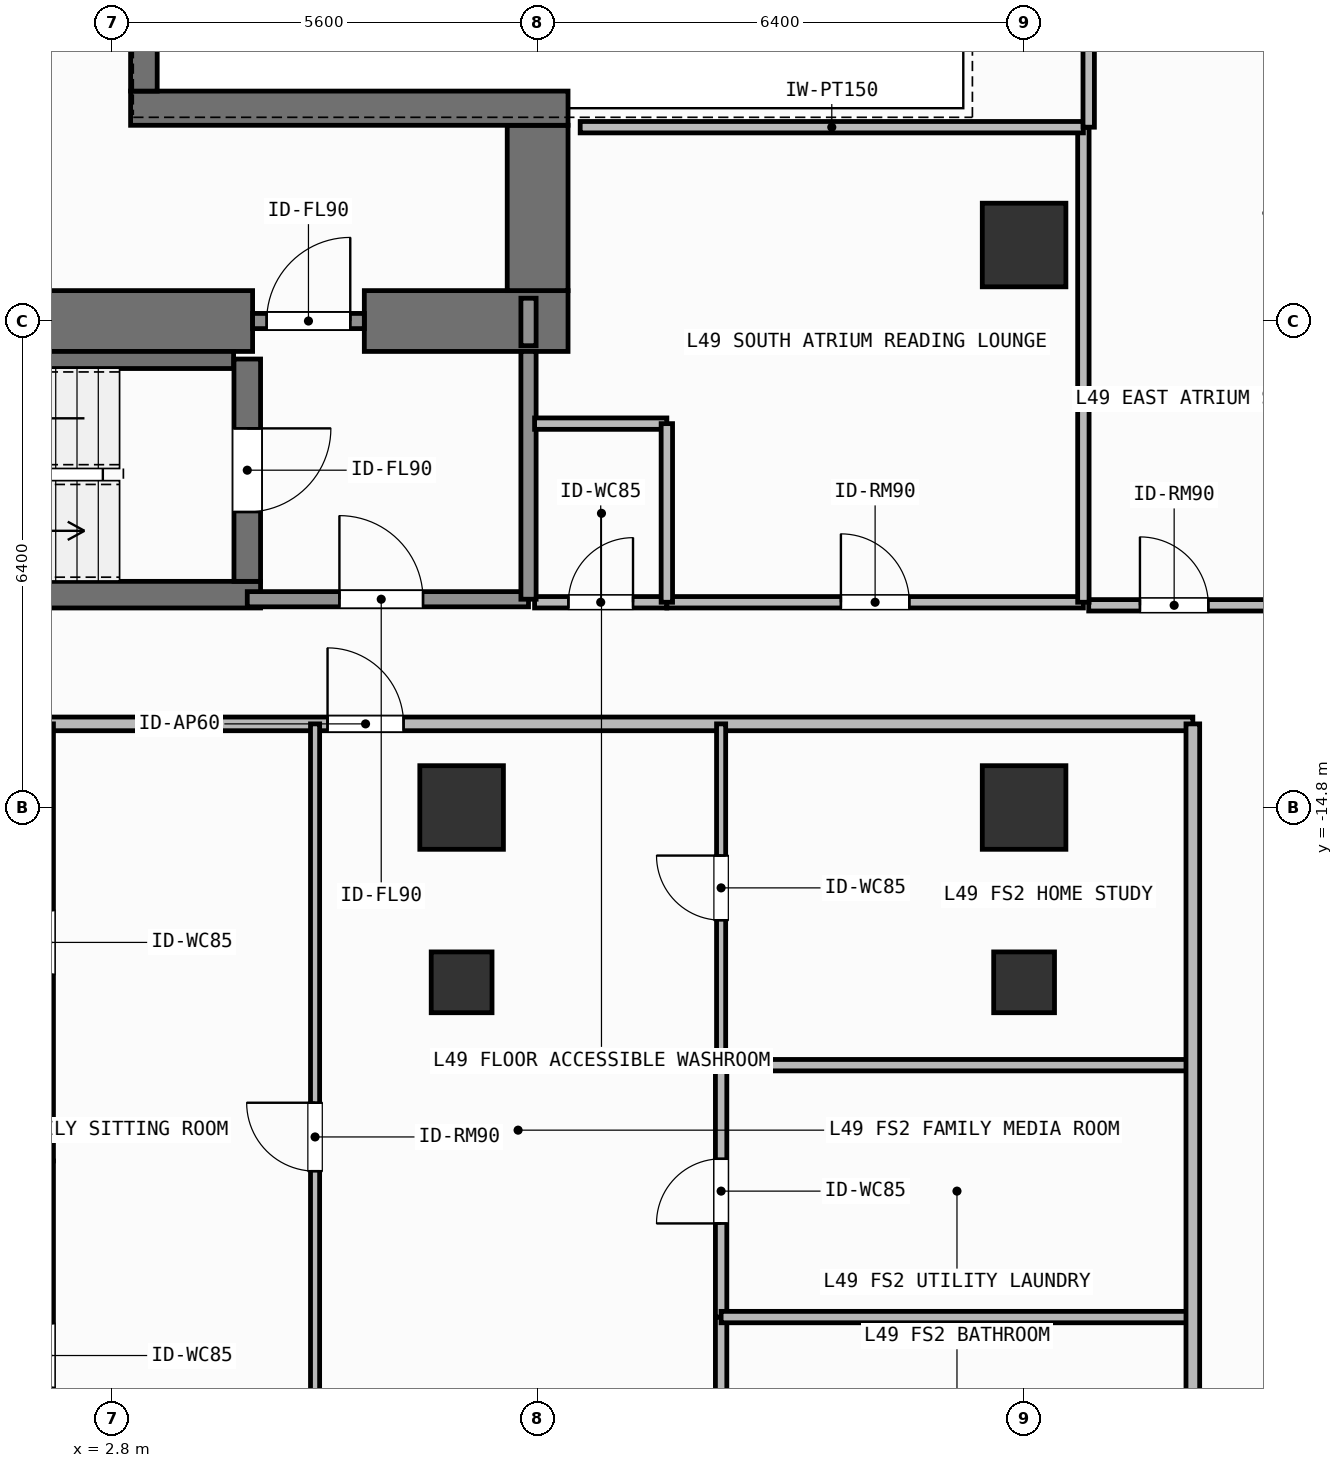
"""IFC4 building model, lengths in metres.
Left out: names, types, materials, properties, quantities, classifications, styles, units other than length and angle.
Written with IfcOpenShell. Run it as: python <this file> out.ifc"""

import sys

from ifc_helpers import new_model, si_unit, direction, frame, frame_2d, origin, origin_2d, place, context, subcontext, project, spatial, rectangle, hollow_rectangle, extrude, element, fill, save


model = new_model("IFC4")
c1 = context("Model", 3, precision=1e-05, world=origin(), true_north=direction((0.0, 1.0)))
c2 = subcontext(c1, "Body", "Model", "MODEL_VIEW")
j1 = project(units=[si_unit("LENGTHUNIT", "METRE"), si_unit("PLANEANGLEUNIT", "RADIAN")], contexts=[c1])
p1 = place(None, origin())
s1 = spatial("IfcSite", under=j1, at=p1, CompositionType="ELEMENT")
p2 = place(p1, origin())
s2 = spatial("IfcBuilding", under=s1, at=p2, CompositionType="ELEMENT")
p3 = place(p2, frame((0.0, 0.0, 199.2)))
s3 = spatial("IfcBuildingStorey", under=s2, at=p3, CompositionType="ELEMENT", Elevation=199.2)
p4 = place(p3, frame((-2.62, -8.4, 0.0), z_axis=(0.0, 0.0, 1.0), x_axis=(1.0, 0.0, 0.0)))
e1 = element("IfcWall", 1, at=p4, inside=s3, PredefinedType="SHEAR", context=c2, shape_type="SweptSolid", body=[
    extrude(rectangle(XDim=7.27, YDim=0.8, at=frame_2d((3.635, 0.0))), origin(), (0.0, 0.0, 1.0), 3.9),
])
p5 = place(p3, frame((6.12, -8.4, 0.0), z_axis=(0.0, 0.0, 1.0), x_axis=(1.0, 0.0, 0.0)))
e2 = element("IfcWall", 2, at=p5, inside=s3, PredefinedType="SHEAR", context=c2, shape_type="SweptSolid", body=[
    extrude(rectangle(XDim=2.68, YDim=0.8, at=frame_2d((1.34, 0.0))), origin(), (0.0, 0.0, 1.0), 3.9),
])
p6 = place(p3, frame((8.4, -8.0, 0.0), z_axis=(0.0, 0.0, 1.0), x_axis=(0.0, 1.0, 0.0)))
e3 = element("IfcWall", 3, at=p6, inside=s3, PredefinedType="SHEAR", context=c2, shape_type="SweptSolid", body=[
    extrude(rectangle(XDim=2.175, YDim=0.8, at=frame_2d((1.087, 0.0))), origin(), (0.0, 0.0, 1.0), 3.9),
])
p7 = place(p3, frame((3.045, -5.6, 0.0), z_axis=(0.0, 0.0, 1.0), x_axis=(1.0, 0.0, 0.0)))
e4 = element("IfcWall", 4, at=p7, inside=s3, PredefinedType="SHEAR", context=c2, shape_type="SweptSolid", body=[
    extrude(rectangle(XDim=5.755, YDim=0.45, at=frame_2d((2.877, 0.0))), origin(), (0.0, 0.0, 1.0), 3.9),
])
p8 = place(p3, frame((3.22, -5.375, 0.0), z_axis=(0.0, 0.0, 1.0), x_axis=(0.0, 1.0, 0.0)))
e5 = element("IfcWall", 5, at=p8, inside=s3, PredefinedType="SHEAR", context=c2, shape_type="SweptSolid", body=[
    extrude(rectangle(XDim=10.75, YDim=0.35, at=frame_2d((5.375, 0.0))), origin(), (0.0, 0.0, 1.0), 3.9),
])
p9 = place(p3, frame((-2.555, -12.0, 0.0), z_axis=(0.0, 0.0, 1.0), x_axis=(1.0, 0.0, 0.0)))
e6 = element("IfcWall", 6, at=p9, inside=s3, PredefinedType="SHEAR", context=c2, shape_type="SweptSolid", body=[
    extrude(rectangle(XDim=7.31, YDim=0.35, at=frame_2d((3.655, 0.0))), origin(), (0.0, 0.0, 1.0), 3.9),
])
p10 = place(p3, frame((-2.2, -8.913, 0.0), z_axis=(0.0, 0.0, 1.0), x_axis=(1.0, 0.0, 0.0)))
e7 = element("IfcWall", 7, at=p10, inside=s3, PredefinedType="SHEAR", context=c2, shape_type="SweptSolid", body=[
    extrude(rectangle(XDim=6.6, YDim=0.225, at=frame_2d((3.3, 0.0))), origin(), (0.0, 0.0, 1.0), 3.9),
])
p11 = place(p3, frame((4.58, -8.9, 0.0), z_axis=(0.0, 0.0, 1.0), x_axis=(0.0, -1.0, 0.0)))
e8 = element("IfcWall", 8, at=p11, inside=s3, PredefinedType="SHEAR", context=c2, shape_type="SweptSolid", body=[
    extrude(rectangle(XDim=2.925, YDim=0.35, at=frame_2d((1.462, 0.0))), origin(), (0.0, 0.0, 1.0), 3.9),
])
p12 = place(p11, frame((0.913, 0.0, 0.0)))
e9 = element("IfcOpeningElement", 9, at=p12, cuts=e8, PredefinedType="OPENING", context=c2, shape_type="SweptSolid", body=[
    extrude(rectangle(XDim=1.1, YDim=2.15, at=frame_2d((0.55, 1.075))), frame((0.0, 0.185, 0.0), z_axis=(0.0, -1.0, 0.0), x_axis=(1.0, 0.0, 0.0)), (0.0, 0.0, 1.0), 0.37),
])
for number, where, z_axis, x_axis in (
    (10, (7.4, -14.8, 0.0), (0.0, 0.0, 1.0), (1.0, 0.0, 0.0)),
    (11, (14.8, -14.8, 0.0), (0.0, 0.0, 1.0), (1.0, 0.0, 0.0)),
    (12, (14.8, -7.4, 0.0), (0.0, 0.0, 1.0), (1.0, 0.0, 0.0)),
):
    element("IfcColumn", number, at=place(p3, frame(where, z_axis=z_axis, x_axis=x_axis)), inside=s3, PredefinedType="COLUMN", context=c2, shape_type="SweptSolid", body=[
        extrude(rectangle(XDim=1.1, YDim=1.1, at=origin_2d()), origin(), (0.0, 0.0, 1.0), 3.9),
    ])
for number, where, z_axis, x_axis in (
    (13, (7.4, -17.1, 0.0), (0.0, 0.0, 1.0), (1.0, 0.0, 0.0)),
    (14, (14.8, -17.1, 0.0), (0.0, 0.0, 1.0), (1.0, 0.0, 0.0)),
):
    element("IfcColumn", number, at=place(p3, frame(where, z_axis=z_axis, x_axis=x_axis)), inside=s3, PredefinedType="COLUMN", context=c2, shape_type="SweptSolid", body=[
        extrude(hollow_rectangle(XDim=0.8, YDim=0.8, WallThickness=0.036, at=origin_2d()), origin(), (0.0, 0.0, 1.0), 3.9),
    ])
p13 = place(p3, frame((4.58, -12.06, 0.0), z_axis=(0.0, 0.0, 1.0), x_axis=(1.0, 0.0, 0.0)))
e15 = element("IfcWall", 15, at=p13, inside=s3, PredefinedType="SOLIDWALL", context=c2, shape_type="SweptSolid", body=[
    extrude(rectangle(XDim=3.7, YDim=0.2, at=frame_2d((1.85, 0.0))), origin(), (0.0, 0.0, 1.0), 3.68),
])
p14 = place(p13, frame((1.212, 0.0, 0.0)))
e16 = element("IfcOpeningElement", 16, at=p14, cuts=e15, PredefinedType="OPENING", context=c2, shape_type="SweptSolid", body=[
    extrude(rectangle(XDim=1.1, YDim=2.15, at=frame_2d((0.55, 1.075))), frame((0.0, 0.11, 0.0), z_axis=(0.0, -1.0, 0.0), x_axis=(1.0, 0.0, 0.0)), (0.0, 0.0, 1.0), 0.22),
])
p15 = place(p3, frame((4.65, -8.4, 0.0), z_axis=(0.0, 0.0, 1.0), x_axis=(1.0, 0.0, 0.0)))
e17 = element("IfcWall", 17, at=p15, inside=s3, PredefinedType="SOLIDWALL", context=c2, shape_type="SweptSolid", body=[
    extrude(rectangle(XDim=1.47, YDim=0.2, at=frame_2d((0.735, 0.0))), origin(), (0.0, 0.0, 1.0), 2.82),
])
p16 = place(p15, frame((0.185, 0.0, 0.0)))
e18 = element("IfcOpeningElement", 18, at=p16, cuts=e17, PredefinedType="OPENING", context=c2, shape_type="SweptSolid", body=[
    extrude(rectangle(XDim=1.1, YDim=2.15, at=frame_2d((0.55, 1.075))), frame((0.0, 0.11, 0.0), z_axis=(0.0, -1.0, 0.0), x_axis=(1.0, 0.0, 0.0)), (0.0, 0.0, 1.0), 0.22),
])
p17 = place(p3, frame((8.36, -12.1, 0.0), z_axis=(0.0, 0.0, 1.0), x_axis=(1.0, 0.0, 0.0)))
e19 = element("IfcWall", 19, at=p17, inside=s3, PredefinedType="PARTITIONING", context=c2, shape_type="SweptSolid", body=[
    extrude(rectangle(XDim=1.74, YDim=0.15, at=frame_2d((0.87, 0.0))), origin(), (0.0, 0.0, 1.0), 3.68),
])
p18 = place(p17, frame((0.445, 0.0, 0.0)))
e20 = element("IfcOpeningElement", 20, at=p18, cuts=e19, PredefinedType="OPENING", context=c2, shape_type="SweptSolid", body=[
    extrude(rectangle(XDim=0.85, YDim=2.1, at=frame_2d((0.425, 1.05))), frame((0.0, 0.085, 0.0), z_axis=(0.0, -1.0, 0.0), x_axis=(1.0, 0.0, 0.0)), (0.0, 0.0, 1.0), 0.17),
])
p19 = place(p3, frame((10.1, -12.1, 0.0), z_axis=(0.0, 0.0, 1.0), x_axis=(1.0, 0.0, 0.0)))
e21 = element("IfcWall", 21, at=p19, inside=s3, PredefinedType="PARTITIONING", context=c2, shape_type="SweptSolid", body=[
    extrude(rectangle(XDim=5.48, YDim=0.15, at=frame_2d((2.74, 0.0))), origin(), (0.0, 0.0, 1.0), 3.68),
])
p20 = place(p19, frame((2.29, 0.0, 0.0)))
e22 = element("IfcOpeningElement", 22, at=p20, cuts=e21, PredefinedType="OPENING", context=c2, shape_type="SweptSolid", body=[
    extrude(rectangle(XDim=0.9, YDim=2.1, at=frame_2d((0.45, 1.05))), frame((0.0, 0.085, 0.0), z_axis=(0.0, -1.0, 0.0), x_axis=(1.0, 0.0, 0.0)), (0.0, 0.0, 1.0), 0.17),
])
p21 = place(p3, frame((-4.927, -13.7, 0.0), z_axis=(0.0, 0.0, 1.0), x_axis=(1.0, 0.0, 0.0)))
e23 = element("IfcWall", 23, at=p21, inside=s3, PredefinedType="PARTITIONING", context=c2, shape_type="SweptSolid", body=[
    extrude(rectangle(XDim=21.947, YDim=0.18, at=frame_2d((10.974, 0.0))), origin(), (0.0, 0.0, 1.0), 3.68),
])
p22 = place(p21, frame((10.563, 0.0, 0.0)))
e24 = element("IfcOpeningElement", 24, at=p22, cuts=e23, PredefinedType="OPENING", context=c2, shape_type="SweptSolid", body=[
    extrude(rectangle(XDim=1.0, YDim=2.2, at=frame_2d((0.5, 1.1))), frame((0.0, 0.1, 0.0), z_axis=(0.0, -1.0, 0.0), x_axis=(1.0, 0.0, 0.0)), (0.0, 0.0, 1.0), 0.2),
])
p23 = place(p3, frame((5.472, -24.39, 0.0), z_axis=(0.0, 0.0, 1.0), x_axis=(0.0, 1.0, 0.0)))
e25 = element("IfcWall", 25, at=p23, inside=s3, PredefinedType="PARTITIONING", context=c2, shape_type="SweptSolid", body=[
    extrude(rectangle(XDim=10.69, YDim=0.12, at=frame_2d((5.345, 0.0))), origin(), (0.0, 0.0, 1.0), 3.68),
])
p24 = place(p23, frame((4.806, 0.0, 0.0)))
e26 = element("IfcOpeningElement", 26, at=p24, cuts=e25, PredefinedType="OPENING", context=c2, shape_type="SweptSolid", body=[
    extrude(rectangle(XDim=0.9, YDim=2.1, at=frame_2d((0.45, 1.05))), frame((0.0, 0.07, 0.0), z_axis=(0.0, -1.0, 0.0), x_axis=(1.0, 0.0, 0.0)), (0.0, 0.0, 1.0), 0.14),
])
p25 = place(p3, frame((1.955, -24.39, 0.0), z_axis=(0.0, 0.0, 1.0), x_axis=(0.0, 1.0, 0.0)))
e27 = element("IfcWall", 27, at=p25, inside=s3, PredefinedType="PARTITIONING", context=c2, shape_type="SweptSolid", body=[
    extrude(rectangle(XDim=4.94, YDim=0.15, at=frame_2d((2.47, 0.0))), origin(), (0.0, 0.0, 1.0), 3.68),
])
p26 = place(p25, frame((1.955, 0.0, 0.0)))
e28 = element("IfcOpeningElement", 28, at=p26, cuts=e27, PredefinedType="OPENING", context=c2, shape_type="SweptSolid", body=[
    extrude(rectangle(XDim=0.85, YDim=2.1, at=frame_2d((0.425, 1.05))), frame((0.0, 0.085, 0.0), z_axis=(0.0, -1.0, 0.0), x_axis=(1.0, 0.0, 0.0)), (0.0, 0.0, 1.0), 0.17),
])
p27 = place(p3, frame((1.955, -19.45, 0.0), z_axis=(0.0, 0.0, 1.0), x_axis=(0.0, 1.0, 0.0)))
e29 = element("IfcWall", 29, at=p27, inside=s3, PredefinedType="PARTITIONING", context=c2, shape_type="SweptSolid", body=[
    extrude(rectangle(XDim=5.75, YDim=0.15, at=frame_2d((2.875, 0.0))), origin(), (0.0, 0.0, 1.0), 3.68),
])
p28 = place(p27, frame((2.45, 0.0, 0.0)))
e30 = element("IfcOpeningElement", 30, at=p28, cuts=e29, PredefinedType="OPENING", context=c2, shape_type="SweptSolid", body=[
    extrude(rectangle(XDim=0.85, YDim=2.1, at=frame_2d((0.425, 1.05))), frame((0.0, 0.085, 0.0), z_axis=(0.0, -1.0, 0.0), x_axis=(1.0, 0.0, 0.0)), (0.0, 0.0, 1.0), 0.17),
])
p29 = place(p3, frame((10.814, -24.39, 0.0), z_axis=(0.0, 0.0, 1.0), x_axis=(0.0, 1.0, 0.0)))
e31 = element("IfcWall", 31, at=p29, inside=s3, PredefinedType="PARTITIONING", context=c2, shape_type="SweptSolid", body=[
    extrude(rectangle(XDim=2.886, YDim=0.15, at=frame_2d((1.443, 0.0))), origin(), (0.0, 0.0, 1.0), 3.68),
])
p30 = place(p29, frame((1.018, 0.0, 0.0)))
e32 = element("IfcOpeningElement", 32, at=p30, cuts=e31, PredefinedType="OPENING", context=c2, shape_type="SweptSolid", body=[
    extrude(rectangle(XDim=0.85, YDim=2.1, at=frame_2d((0.425, 1.05))), frame((0.0, 0.085, 0.0), z_axis=(0.0, -1.0, 0.0), x_axis=(1.0, 0.0, 0.0)), (0.0, 0.0, 1.0), 0.17),
])
p31 = place(p3, frame((10.814, -21.504, 0.0), z_axis=(0.0, 0.0, 1.0), x_axis=(0.0, 1.0, 0.0)))
e33 = element("IfcWall", 33, at=p31, inside=s3, PredefinedType="PARTITIONING", context=c2, shape_type="SweptSolid", body=[
    extrude(rectangle(XDim=3.314, YDim=0.15, at=frame_2d((1.657, 0.0))), origin(), (0.0, 0.0, 1.0), 3.68),
])
p32 = place(p31, frame((1.232, 0.0, 0.0)))
e34 = element("IfcOpeningElement", 34, at=p32, cuts=e33, PredefinedType="OPENING", context=c2, shape_type="SweptSolid", body=[
    extrude(rectangle(XDim=0.85, YDim=2.1, at=frame_2d((0.425, 1.05))), frame((0.0, 0.085, 0.0), z_axis=(0.0, -1.0, 0.0), x_axis=(1.0, 0.0, 0.0)), (0.0, 0.0, 1.0), 0.17),
])
p33 = place(p3, frame((10.814, -18.19, 0.0), z_axis=(0.0, 0.0, 1.0), x_axis=(0.0, 1.0, 0.0)))
e35 = element("IfcWall", 35, at=p33, inside=s3, PredefinedType="PARTITIONING", context=c2, shape_type="SweptSolid", body=[
    extrude(rectangle(XDim=4.49, YDim=0.12, at=frame_2d((2.245, 0.0))), origin(), (0.0, 0.0, 1.0), 3.68),
])
p34 = place(p33, frame((1.907, 0.0, 0.0)))
e36 = element("IfcOpeningElement", 36, at=p34, cuts=e35, PredefinedType="OPENING", context=c2, shape_type="SweptSolid", body=[
    extrude(rectangle(XDim=0.85, YDim=2.1, at=frame_2d((0.425, 1.05))), frame((0.0, 0.07, 0.0), z_axis=(0.0, -1.0, 0.0), x_axis=(1.0, 0.0, 0.0)), (0.0, 0.0, 1.0), 0.14),
])
p35 = place(p3, frame((15.65, -12.14, 0.0), z_axis=(0.0, 0.0, 1.0), x_axis=(1.0, 0.0, 0.0)))
e37 = element("IfcWall", 37, at=p35, inside=s3, PredefinedType="PARTITIONING", context=c2, shape_type="SweptSolid", body=[
    extrude(rectangle(XDim=2.42, YDim=0.15, at=frame_2d((1.21, 0.0))), origin(), (0.0, 0.0, 1.0), 3.68),
])
p36 = place(p35, frame((0.674, 0.0, 0.0)))
e38 = element("IfcOpeningElement", 38, at=p36, cuts=e37, PredefinedType="OPENING", context=c2, shape_type="SweptSolid", body=[
    extrude(rectangle(XDim=0.9, YDim=2.1, at=frame_2d((0.45, 1.05))), frame((0.0, 0.085, 0.0), z_axis=(0.0, -1.0, 0.0), x_axis=(1.0, 0.0, 0.0)), (0.0, 0.0, 1.0), 0.17),
])
p37 = place(p3, frame((8.28, -12.06, 0.0), z_axis=(0.0, 0.0, 1.0), x_axis=(0.0, 1.0, 0.0)))
e39 = element("IfcWall", 39, at=p37, inside=s3, PredefinedType="SOLIDWALL", context=c2, shape_type="SweptSolid", body=[
    extrude(rectangle(XDim=3.26, YDim=0.2, at=frame_2d((1.63, 0.0))), origin(), (0.0, 0.0, 1.0), 3.68),
])
p38 = place(p3, frame((8.28, -8.725, 0.0), z_axis=(0.0, 0.0, 1.0), x_axis=(0.0, 1.0, 0.0)))
e40 = element("IfcWall", 40, at=p38, inside=s3, PredefinedType="SOLIDWALL", context=c2, shape_type="SweptSolid", body=[
    extrude(rectangle(XDim=0.625, YDim=0.2, at=frame_2d((0.312, 0.0))), origin(), (0.0, 0.0, 1.0), 3.68),
])
p39 = place(p3, frame((8.36, -9.75, 0.0), z_axis=(0.0, 0.0, 1.0), x_axis=(1.0, 0.0, 0.0)))
e41 = element("IfcWall", 41, at=p39, inside=s3, PredefinedType="PARTITIONING", context=c2, shape_type="SweptSolid", body=[
    extrude(rectangle(XDim=1.74, YDim=0.15, at=frame_2d((0.87, 0.0))), origin(), (0.0, 0.0, 1.0), 3.68),
])
p40 = place(p3, frame((10.1, -12.1, 0.0), z_axis=(0.0, 0.0, 1.0), x_axis=(0.0, 1.0, 0.0)))
e42 = element("IfcWall", 42, at=p40, inside=s3, PredefinedType="PARTITIONING", context=c2, shape_type="SweptSolid", body=[
    extrude(rectangle(XDim=2.35, YDim=0.15, at=frame_2d((1.175, 0.0))), origin(), (0.0, 0.0, 1.0), 3.68),
])
p41 = place(p3, frame((15.58, -12.1, 0.0), z_axis=(0.0, 0.0, 1.0), x_axis=(0.0, 1.0, 0.0)))
e43 = element("IfcWall", 43, at=p41, inside=s3, PredefinedType="PARTITIONING", context=c2, shape_type="SweptSolid", body=[
    extrude(rectangle(XDim=6.25, YDim=0.15, at=frame_2d((3.125, 0.0))), origin(), (0.0, 0.0, 1.0), 3.68),
])
p42 = place(p3, frame((8.96, -5.85, 0.0), z_axis=(0.0, 0.0, 1.0), x_axis=(1.0, 0.0, 0.0)))
e44 = element("IfcWall", 44, at=p42, inside=s3, PredefinedType="PARTITIONING", context=c2, shape_type="SweptSolid", body=[
    extrude(rectangle(XDim=6.62, YDim=0.15, at=frame_2d((3.31, 0.0))), origin(), (0.0, 0.0, 1.0), 3.68),
])
p43 = place(p3, frame((10.814, -21.504, 0.0), z_axis=(0.0, 0.0, 1.0), x_axis=(1.0, 0.0, 0.0)))
e45 = element("IfcWall", 45, at=p43, inside=s3, PredefinedType="PARTITIONING", context=c2, shape_type="SweptSolid", body=[
    extrude(rectangle(XDim=6.206, YDim=0.15, at=frame_2d((3.103, 0.0))), origin(), (0.0, 0.0, 1.0), 3.42),
])
p44 = place(p3, frame((10.814, -18.19, 0.0), z_axis=(0.0, 0.0, 1.0), x_axis=(1.0, 0.0, 0.0)))
e46 = element("IfcWall", 46, at=p44, inside=s3, PredefinedType="PARTITIONING", context=c2, shape_type="SweptSolid", body=[
    extrude(rectangle(XDim=6.206, YDim=0.15, at=frame_2d((3.103, 0.0))), origin(), (0.0, 0.0, 1.0), 3.68),
])
p45 = place(p3, frame((17.02, -27.51, 0.0), z_axis=(0.0, 0.0, 1.0), x_axis=(0.0, 1.0, 0.0)))
e47 = element("IfcWall", 47, at=p45, inside=s3, PredefinedType="PARTITIONING", context=c2, shape_type="SweptSolid", body=[
    extrude(rectangle(XDim=13.81, YDim=0.18, at=frame_2d((6.905, 0.0))), origin(), (0.0, 0.0, 1.0), 3.68),
])
p46 = place(p3, frame((15.65, -5.85, 0.0), z_axis=(0.0, 0.0, 1.0), x_axis=(0.0, 1.0, 0.0)))
e48 = element("IfcWall", 48, at=p46, inside=s3, PredefinedType="PARTITIONING", context=c2, shape_type="SweptSolid", body=[
    extrude(rectangle(XDim=4.05, YDim=0.15, at=frame_2d((2.025, 0.0))), origin(), (0.0, 0.0, 1.0), 3.68),
])
p47 = place(p12, origin())
e49 = element("IfcDoor", 49, at=p47, inside=s3, OperationType="SINGLE_SWING_LEFT", PredefinedType="DOOR", context=c2, shape_type="SweptSolid", body=[
    extrude(rectangle(XDim=1.1, YDim=2.15, at=frame_2d((0.55, 1.075))), frame((0.0, 0.025, 0.0), z_axis=(0.0, -1.0, 0.0), x_axis=(1.0, 0.0, 0.0)), (0.0, 0.0, 1.0), 0.05),
])
fill(e9, e49)
p48 = place(p14, origin())
e50 = element("IfcDoor", 50, at=p48, inside=s3, OperationType="SINGLE_SWING_LEFT", PredefinedType="DOOR", context=c2, shape_type="SweptSolid", body=[
    extrude(rectangle(XDim=1.1, YDim=2.15, at=frame_2d((0.55, 1.075))), frame((0.0, 0.025, 0.0), z_axis=(0.0, -1.0, 0.0), x_axis=(1.0, 0.0, 0.0)), (0.0, 0.0, 1.0), 0.05),
])
fill(e16, e50)
p49 = place(p16, origin())
e51 = element("IfcDoor", 51, at=p49, inside=s3, OperationType="SINGLE_SWING_RIGHT", PredefinedType="DOOR", context=c2, shape_type="SweptSolid", body=[
    extrude(rectangle(XDim=1.1, YDim=2.15, at=frame_2d((0.55, 1.075))), frame((0.0, 0.025, 0.0), z_axis=(0.0, -1.0, 0.0), x_axis=(1.0, 0.0, 0.0)), (0.0, 0.0, 1.0), 0.05),
])
fill(e18, e51)
p50 = place(p18, origin())
e52 = element("IfcDoor", 52, at=p50, inside=s3, OperationType="SINGLE_SWING_RIGHT", PredefinedType="DOOR", context=c2, shape_type="SweptSolid", body=[
    extrude(rectangle(XDim=0.85, YDim=2.1, at=frame_2d((0.425, 1.05))), frame((0.0, 0.025, 0.0), z_axis=(0.0, -1.0, 0.0), x_axis=(1.0, 0.0, 0.0)), (0.0, 0.0, 1.0), 0.05),
])
fill(e20, e52)
p51 = place(p20, origin())
e53 = element("IfcDoor", 53, at=p51, inside=s3, OperationType="SINGLE_SWING_LEFT", PredefinedType="DOOR", context=c2, shape_type="SweptSolid", body=[
    extrude(rectangle(XDim=0.9, YDim=2.1, at=frame_2d((0.45, 1.05))), frame((0.0, 0.025, 0.0), z_axis=(0.0, -1.0, 0.0), x_axis=(1.0, 0.0, 0.0)), (0.0, 0.0, 1.0), 0.05),
])
fill(e22, e53)
p52 = place(p22, origin())
e54 = element("IfcDoor", 54, at=p52, inside=s3, OperationType="SINGLE_SWING_LEFT", PredefinedType="DOOR", context=c2, shape_type="SweptSolid", body=[
    extrude(rectangle(XDim=1.0, YDim=2.2, at=frame_2d((0.5, 1.1))), frame((0.0, 0.025, 0.0), z_axis=(0.0, -1.0, 0.0), x_axis=(1.0, 0.0, 0.0)), (0.0, 0.0, 1.0), 0.05),
])
fill(e24, e54)
p53 = place(p24, origin())
e55 = element("IfcDoor", 55, at=p53, inside=s3, OperationType="SINGLE_SWING_RIGHT", PredefinedType="DOOR", context=c2, shape_type="SweptSolid", body=[
    extrude(rectangle(XDim=0.9, YDim=2.1, at=frame_2d((0.45, 1.05))), frame((0.0, 0.025, 0.0), z_axis=(0.0, -1.0, 0.0), x_axis=(1.0, 0.0, 0.0)), (0.0, 0.0, 1.0), 0.05),
])
fill(e26, e55)
p54 = place(p32, origin())
e56 = element("IfcDoor", 56, at=p54, inside=s3, OperationType="SINGLE_SWING_LEFT", PredefinedType="DOOR", context=c2, shape_type="SweptSolid", body=[
    extrude(rectangle(XDim=0.85, YDim=2.1, at=frame_2d((0.425, 1.05))), frame((0.0, 0.025, 0.0), z_axis=(0.0, -1.0, 0.0), x_axis=(1.0, 0.0, 0.0)), (0.0, 0.0, 1.0), 0.05),
])
fill(e34, e56)
p55 = place(p34, origin())
e57 = element("IfcDoor", 57, at=p55, inside=s3, OperationType="SINGLE_SWING_RIGHT", PredefinedType="DOOR", context=c2, shape_type="SweptSolid", body=[
    extrude(rectangle(XDim=0.85, YDim=2.1, at=frame_2d((0.425, 1.05))), frame((0.0, 0.025, 0.0), z_axis=(0.0, -1.0, 0.0), x_axis=(1.0, 0.0, 0.0)), (0.0, 0.0, 1.0), 0.05),
])
fill(e36, e57)
p56 = place(p36, origin())
e58 = element("IfcDoor", 58, at=p56, inside=s3, OperationType="SINGLE_SWING_LEFT", PredefinedType="DOOR", context=c2, shape_type="SweptSolid", body=[
    extrude(rectangle(XDim=0.9, YDim=2.1, at=frame_2d((0.45, 1.05))), frame((0.0, 0.025, 0.0), z_axis=(0.0, -1.0, 0.0), x_axis=(1.0, 0.0, 0.0)), (0.0, 0.0, 1.0), 0.05),
])
fill(e38, e58)
save(model, sys.argv[1])
